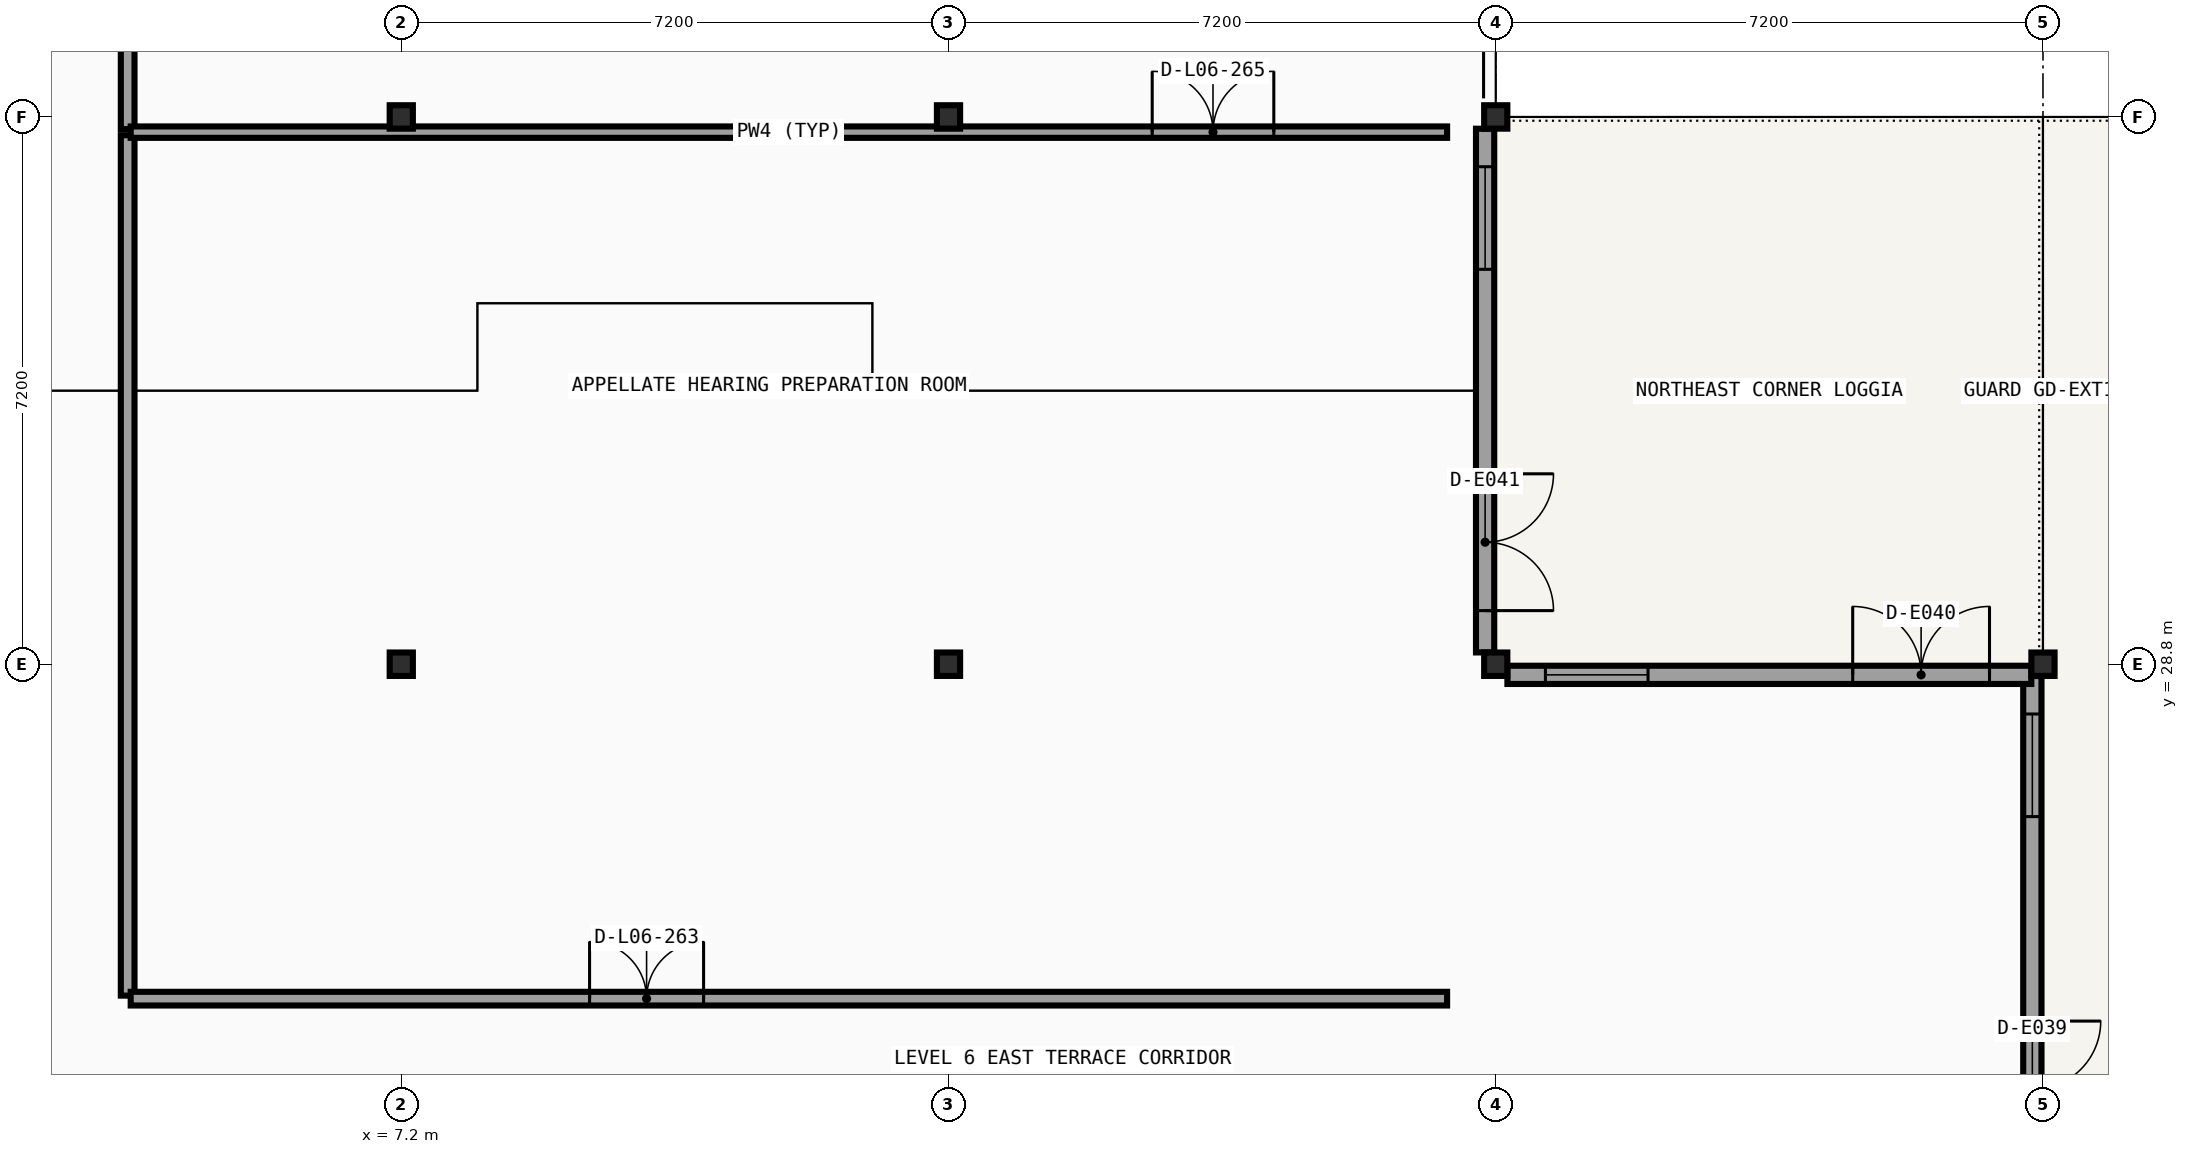
"""IFC4 building model, lengths in metres.
Left out: names, types, materials, properties, quantities, classifications, styles, units other than length and angle.
Written with IfcOpenShell. Run it as: python <this file> out.ifc"""

import sys

from ifc_helpers import new_model, si_unit, direction, frame, frame_2d, origin, origin_2d, place, context, subcontext, project, spatial, rectangle, i_section, extrude, element, fill, save


model = new_model("IFC4")
c1 = context("Model", 3, precision=1e-05, world=origin(), true_north=direction((0.0, 1.0)))
c2 = subcontext(c1, "Body", "Model", "MODEL_VIEW")
j1 = project(units=[si_unit("LENGTHUNIT", "METRE"), si_unit("PLANEANGLEUNIT", "RADIAN")], contexts=[c1])
p1 = place(None, origin())
s1 = spatial("IfcSite", under=j1, at=p1, CompositionType="ELEMENT")
p2 = place(p1, origin())
s2 = spatial("IfcBuilding", under=s1, at=p2, CompositionType="ELEMENT")
p3 = place(p2, frame((0.0, 0.0, 27.0)))
s3 = spatial("IfcBuildingStorey", under=s2, at=p3, CompositionType="ELEMENT", Elevation=27.0)
for number, where, z_axis, x_axis in (
    (1, (7.2, 28.8, 0.0), (0.0, 0.0, 1.0), (1.0, 0.0, 0.0)),
    (2, (7.2, 36.0, 0.0), (0.0, 0.0, 1.0), (1.0, 0.0, 0.0)),
    (3, (14.4, 28.8, 0.0), (0.0, 0.0, 1.0), (1.0, 0.0, 0.0)),
    (4, (14.4, 36.0, 0.0), (0.0, 0.0, 1.0), (1.0, 0.0, 0.0)),
    (5, (21.6, 28.8, 0.0), (0.0, 0.0, 1.0), (1.0, 0.0, 0.0)),
    (6, (21.6, 36.0, 0.0), (0.0, 0.0, 1.0), (1.0, 0.0, 0.0)),
    (7, (28.8, 28.8, 0.0), (0.0, 0.0, 1.0), (1.0, 0.0, 0.0)),
):
    element("IfcColumn", number, at=place(p3, frame(where, z_axis=z_axis, x_axis=x_axis)), inside=s3, PredefinedType="COLUMN", context=c2, shape_type="SweptSolid", body=[
        extrude(i_section(OverallWidth=0.305, OverallDepth=0.308, WebThickness=0.01, FlangeThickness=0.015, FilletRadius=0.015, at=origin_2d()), origin(), (0.0, 0.0, 1.0), 4.05),
    ])
p4 = place(p3, frame((28.66, 21.755, 0.0), z_axis=(0.0, 0.0, 1.0), x_axis=(0.0, 1.0, 0.0)))
e8 = element("IfcWall", 8, at=p4, inside=s3, PredefinedType="SOLIDWALL", context=c2, shape_type="SweptSolid", body=[
    extrude(rectangle(XDim=6.89, YDim=0.24, at=frame_2d((3.445, 0.0))), origin(), (0.0, 0.0, 1.0), 3.256),
])
p5 = place(p4, frame((0.55, 0.0, 0.0)))
e9 = element("IfcOpeningElement", 9, at=p5, cuts=e8, PredefinedType="OPENING", context=c2, shape_type="SweptSolid", body=[
    extrude(rectangle(XDim=1.8, YDim=2.15, at=frame_2d((0.9, 1.075))), frame((0.0, 0.13, 0.0), z_axis=(0.0, -1.0, 0.0), x_axis=(1.0, 0.0, 0.0)), (0.0, 0.0, 1.0), 0.26),
])
p6 = place(p4, frame((5.04, 0.0, 0.85)))
e10 = element("IfcOpeningElement", 10, at=p6, cuts=e8, PredefinedType="OPENING", context=c2, shape_type="SweptSolid", body=[
    extrude(rectangle(XDim=1.35, YDim=1.85, at=frame_2d((0.675, 0.925))), frame((0.0, 0.13, 0.0), z_axis=(0.0, -1.0, 0.0), x_axis=(1.0, 0.0, 0.0)), (0.0, 0.0, 1.0), 0.26),
])
p7 = place(p3, frame((28.646, 28.66, 0.0), z_axis=(0.0, 0.0, 1.0), x_axis=(-1.0, 0.0, 0.0)))
e11 = element("IfcWall", 11, at=p7, inside=s3, PredefinedType="SOLIDWALL", context=c2, shape_type="SweptSolid", body=[
    extrude(rectangle(XDim=6.893, YDim=0.24, at=frame_2d((3.447, 0.0))), origin(), (0.0, 0.0, 1.0), 3.246),
])
p8 = place(p7, frame((0.55, 0.0, 0.0)))
e12 = element("IfcOpeningElement", 12, at=p8, cuts=e11, PredefinedType="OPENING", context=c2, shape_type="SweptSolid", body=[
    extrude(rectangle(XDim=1.8, YDim=2.15, at=frame_2d((0.9, 1.075))), frame((0.0, 0.13, 0.0), z_axis=(0.0, -1.0, 0.0), x_axis=(1.0, 0.0, 0.0)), (0.0, 0.0, 1.0), 0.26),
])
p9 = place(p7, frame((5.043, 0.0, 0.85)))
e13 = element("IfcOpeningElement", 13, at=p9, cuts=e11, PredefinedType="OPENING", context=c2, shape_type="SweptSolid", body=[
    extrude(rectangle(XDim=1.35, YDim=1.85, at=frame_2d((0.675, 0.925))), frame((0.0, 0.13, 0.0), z_axis=(0.0, -1.0, 0.0), x_axis=(1.0, 0.0, 0.0)), (0.0, 0.0, 1.0), 0.26),
])
p10 = place(p3, frame((21.46, 28.955, 0.0), z_axis=(0.0, 0.0, 1.0), x_axis=(0.0, 1.0, 0.0)))
e14 = element("IfcWall", 14, at=p10, inside=s3, PredefinedType="SOLIDWALL", context=c2, shape_type="SweptSolid", body=[
    extrude(rectangle(XDim=6.89, YDim=0.24, at=frame_2d((3.445, 0.0))), origin(), (0.0, 0.0, 1.0), 3.246),
])
p11 = place(p10, frame((0.55, 0.0, 0.0)))
e15 = element("IfcOpeningElement", 15, at=p11, cuts=e14, PredefinedType="OPENING", context=c2, shape_type="SweptSolid", body=[
    extrude(rectangle(XDim=1.8, YDim=2.15, at=frame_2d((0.9, 1.075))), frame((0.0, 0.13, 0.0), z_axis=(0.0, -1.0, 0.0), x_axis=(1.0, 0.0, 0.0)), (0.0, 0.0, 1.0), 0.26),
])
p12 = place(p10, frame((5.04, 0.0, 0.85)))
e16 = element("IfcOpeningElement", 16, at=p12, cuts=e14, PredefinedType="OPENING", context=c2, shape_type="SweptSolid", body=[
    extrude(rectangle(XDim=1.35, YDim=1.85, at=frame_2d((0.675, 0.925))), frame((0.0, 0.13, 0.0), z_axis=(0.0, -1.0, 0.0), x_axis=(1.0, 0.0, 0.0)), (0.0, 0.0, 1.0), 0.26),
])
p13 = place(p3, frame((3.6, 24.44, 0.0), z_axis=(0.0, 0.0, 1.0), x_axis=(0.0, 1.0, 0.0)))
e17 = element("IfcWall", 17, at=p13, inside=s3, PredefinedType="PARTITIONING", context=c2, shape_type="SweptSolid", body=[
    extrude(rectangle(XDim=11.32, YDim=0.18, at=frame_2d((5.66, 0.0))), origin(), (0.0, 0.0, 1.0), 3.246),
])
p14 = place(p3, frame((3.6, 35.84, 0.0), z_axis=(0.0, 0.0, 1.0), x_axis=(0.0, 1.0, 0.0)))
e18 = element("IfcWall", 18, at=p14, inside=s3, PredefinedType="PARTITIONING", context=c2, shape_type="SweptSolid", body=[
    extrude(rectangle(XDim=14.92, YDim=0.18, at=frame_2d((7.46, 0.0))), origin(), (0.0, 0.0, 1.0), 3.256),
])
p15 = place(p14, frame((9.78, 0.0, 0.0)))
e19 = element("IfcOpeningElement", 19, at=p15, cuts=e18, PredefinedType="OPENING", context=c2, shape_type="SweptSolid", body=[
    extrude(rectangle(XDim=1.6, YDim=2.1, at=frame_2d((0.8, 1.05))), frame((0.0, 0.1, 0.0), z_axis=(0.0, -1.0, 0.0), x_axis=(1.0, 0.0, 0.0)), (0.0, 0.0, 1.0), 0.2),
])
p16 = place(p3, frame((3.64, 24.4, 0.0), z_axis=(0.0, 0.0, 1.0), x_axis=(1.0, 0.0, 0.0)))
e20 = element("IfcWall", 20, at=p16, inside=s3, PredefinedType="PARTITIONING", context=c2, shape_type="SweptSolid", body=[
    extrude(rectangle(XDim=17.32, YDim=0.18, at=frame_2d((8.66, 0.0))), origin(), (0.0, 0.0, 1.0), 3.8),
])
p17 = place(p16, frame((6.038, 0.0, 0.0)))
e21 = element("IfcOpeningElement", 21, at=p17, cuts=e20, PredefinedType="OPENING", context=c2, shape_type="SweptSolid", body=[
    extrude(rectangle(XDim=1.5, YDim=2.1, at=frame_2d((0.75, 1.05))), frame((0.0, 0.1, 0.0), z_axis=(0.0, -1.0, 0.0), x_axis=(1.0, 0.0, 0.0)), (0.0, 0.0, 1.0), 0.2),
])
p18 = place(p3, frame((3.64, 35.8, 0.0), z_axis=(0.0, 0.0, 1.0), x_axis=(1.0, 0.0, 0.0)))
e22 = element("IfcWall", 22, at=p18, inside=s3, PredefinedType="PARTITIONING", context=c2, shape_type="SweptSolid", body=[
    extrude(rectangle(XDim=17.32, YDim=0.15, at=frame_2d((8.66, 0.0))), origin(), (0.0, 0.0, 1.0), 3.246),
])
p19 = place(p18, frame((13.44, 0.0, 0.0)))
e23 = element("IfcOpeningElement", 23, at=p19, cuts=e22, PredefinedType="OPENING", context=c2, shape_type="SweptSolid", body=[
    extrude(rectangle(XDim=1.6, YDim=2.1, at=frame_2d((0.8, 1.05))), frame((0.0, 0.085, 0.0), z_axis=(0.0, -1.0, 0.0), x_axis=(1.0, 0.0, 0.0)), (0.0, 0.0, 1.0), 0.17),
])
p20 = place(p5, frame((1.8, 0.0, 0.0), z_axis=(0.0, 0.0, 1.0), x_axis=(-1.0, 0.0, 0.0)))
e24 = element("IfcDoor", 24, at=p20, inside=s3, OperationType="DOUBLE_DOOR_SINGLE_SWING", PredefinedType="DOOR", context=c2, shape_type="SweptSolid", body=[
    extrude(rectangle(XDim=1.8, YDim=2.15, at=frame_2d((0.9, 1.075))), frame((0.0, 0.025, 0.0), z_axis=(0.0, -1.0, 0.0), x_axis=(1.0, 0.0, 0.0)), (0.0, 0.0, 1.0), 0.05),
])
fill(e9, e24)
p21 = place(p6, origin())
e25 = element("IfcWindow", 25, at=p21, inside=s3, PartitioningType="SINGLE_PANEL", PredefinedType="WINDOW", context=c2, shape_type="SweptSolid", body=[
    extrude(rectangle(XDim=1.35, YDim=1.85, at=frame_2d((0.675, 0.925))), frame((0.0, 0.03, 0.0), z_axis=(0.0, -1.0, 0.0), x_axis=(1.0, 0.0, 0.0)), (0.0, 0.0, 1.0), 0.06),
])
fill(e10, e25)
p22 = place(p8, frame((1.8, 0.0, 0.0), z_axis=(0.0, 0.0, 1.0), x_axis=(-1.0, 0.0, 0.0)))
e26 = element("IfcDoor", 26, at=p22, inside=s3, OperationType="DOUBLE_DOOR_SINGLE_SWING", PredefinedType="DOOR", context=c2, shape_type="SweptSolid", body=[
    extrude(rectangle(XDim=1.8, YDim=2.15, at=frame_2d((0.9, 1.075))), frame((0.0, 0.025, 0.0), z_axis=(0.0, -1.0, 0.0), x_axis=(1.0, 0.0, 0.0)), (0.0, 0.0, 1.0), 0.05),
])
fill(e12, e26)
p23 = place(p9, origin())
e27 = element("IfcWindow", 27, at=p23, inside=s3, PartitioningType="SINGLE_PANEL", PredefinedType="WINDOW", context=c2, shape_type="SweptSolid", body=[
    extrude(rectangle(XDim=1.35, YDim=1.85, at=frame_2d((0.675, 0.925))), frame((0.0, 0.03, 0.0), z_axis=(0.0, -1.0, 0.0), x_axis=(1.0, 0.0, 0.0)), (0.0, 0.0, 1.0), 0.06),
])
fill(e13, e27)
p24 = place(p11, frame((1.8, 0.0, 0.0), z_axis=(0.0, 0.0, 1.0), x_axis=(-1.0, 0.0, 0.0)))
e28 = element("IfcDoor", 28, at=p24, inside=s3, OperationType="DOUBLE_DOOR_SINGLE_SWING", PredefinedType="DOOR", context=c2, shape_type="SweptSolid", body=[
    extrude(rectangle(XDim=1.8, YDim=2.15, at=frame_2d((0.9, 1.075))), frame((0.0, 0.025, 0.0), z_axis=(0.0, -1.0, 0.0), x_axis=(1.0, 0.0, 0.0)), (0.0, 0.0, 1.0), 0.05),
])
fill(e15, e28)
p25 = place(p12, origin())
e29 = element("IfcWindow", 29, at=p25, inside=s3, PartitioningType="SINGLE_PANEL", PredefinedType="WINDOW", context=c2, shape_type="SweptSolid", body=[
    extrude(rectangle(XDim=1.35, YDim=1.85, at=frame_2d((0.675, 0.925))), frame((0.0, 0.03, 0.0), z_axis=(0.0, -1.0, 0.0), x_axis=(1.0, 0.0, 0.0)), (0.0, 0.0, 1.0), 0.06),
])
fill(e16, e29)
p26 = place(p17, origin())
e30 = element("IfcDoor", 30, at=p26, inside=s3, OperationType="DOUBLE_DOOR_SINGLE_SWING", PredefinedType="DOOR", context=c2, shape_type="SweptSolid", body=[
    extrude(rectangle(XDim=1.5, YDim=2.1, at=frame_2d((0.75, 1.05))), frame((0.0, 0.025, 0.0), z_axis=(0.0, -1.0, 0.0), x_axis=(1.0, 0.0, 0.0)), (0.0, 0.0, 1.0), 0.05),
])
fill(e21, e30)
p27 = place(p19, origin())
e31 = element("IfcDoor", 31, at=p27, inside=s3, OperationType="DOUBLE_DOOR_SINGLE_SWING", PredefinedType="DOOR", context=c2, shape_type="SweptSolid", body=[
    extrude(rectangle(XDim=1.6, YDim=2.1, at=frame_2d((0.8, 1.05))), frame((0.0, 0.025, 0.0), z_axis=(0.0, -1.0, 0.0), x_axis=(1.0, 0.0, 0.0)), (0.0, 0.0, 1.0), 0.05),
])
fill(e23, e31)
save(model, sys.argv[1])
